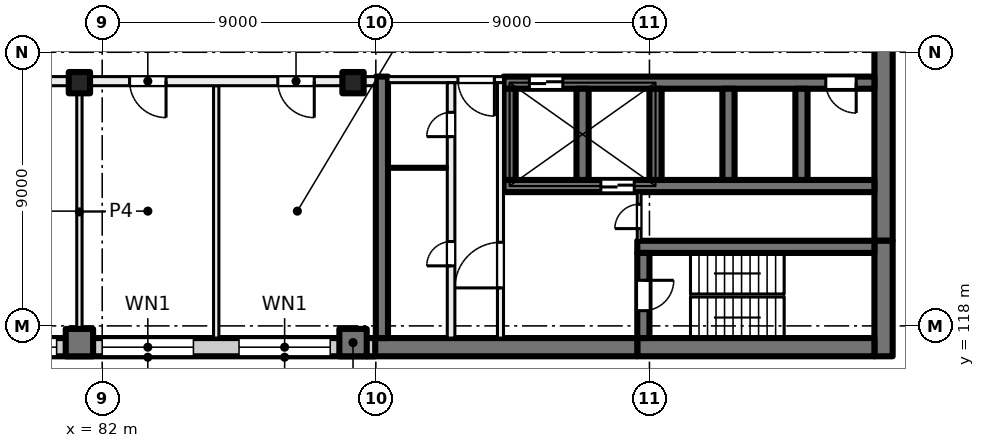
"""IFC4 building model, lengths in metres.
Left out: names, types, materials, properties, quantities, classifications, styles, units other than length and angle.
Written with IfcOpenShell. Run it as: python <this file> out.ifc"""

import sys

from ifc_helpers import new_model, si_unit, direction, frame, frame_2d, origin, origin_2d, place, context, subcontext, project, spatial, rectangle, extrude, element, fill, save


model = new_model("IFC4")
c1 = context("Model", 3, precision=1e-05, world=origin(), true_north=direction((0.0, 1.0)))
c2 = subcontext(c1, "Body", "Model", "MODEL_VIEW")
j1 = project(units=[si_unit("LENGTHUNIT", "METRE"), si_unit("PLANEANGLEUNIT", "RADIAN")], contexts=[c1])
p1 = place(None, origin())
s1 = spatial("IfcSite", under=j1, at=p1, CompositionType="ELEMENT")
p2 = place(p1, origin())
s2 = spatial("IfcBuilding", under=s1, at=p2, CompositionType="ELEMENT")
p3 = place(p2, frame((0.0, 0.0, 51.5)))
s3 = spatial("IfcBuildingStorey", under=s2, at=p3, CompositionType="ELEMENT", Elevation=51.5)
for number, where, z_axis, x_axis in (
    (1, (81.25, 126.0, 0.0), (0.0, 0.0, 1.0), (1.0, 0.0, 0.0)),
    (2, (90.25, 126.0, 0.0), (0.0, 0.0, 1.0), (1.0, 0.0, 0.0)),
):
    element("IfcColumn", number, at=place(p3, frame(where, z_axis=z_axis, x_axis=x_axis)), inside=s3, PredefinedType="COLUMN", context=c2, shape_type="SweptSolid", body=[
        extrude(rectangle(XDim=0.7, YDim=0.7, at=origin_2d()), origin(), (0.0, 0.0, 1.0), 4.0),
    ])
for number, where, z_axis, x_axis in (
    (3, (81.25, 117.45, 0.0), (0.0, 0.0, 1.0), (1.0, 0.0, 0.0)),
    (4, (90.25, 117.45, 0.0), (0.0, 0.0, 1.0), (1.0, 0.0, 0.0)),
):
    element("IfcColumn", number, at=place(p3, frame(where, z_axis=z_axis, x_axis=x_axis)), inside=s3, PredefinedType="COLUMN", context=c2, shape_type="SweptSolid", body=[
        extrude(rectangle(XDim=0.9, YDim=0.9, at=origin_2d()), origin(), (0.0, 0.0, 1.0), 4.0),
    ])
p4 = place(p3, frame((107.7, 135.2, 0.0), z_axis=(0.0, 0.0, 1.0), x_axis=(0.0, -1.0, 0.0)))
e5 = element("IfcWall", 5, at=p4, inside=s3, PredefinedType="SHEAR", context=c2, shape_type="SweptSolid", body=[
    extrude(rectangle(XDim=14.4, YDim=0.6, at=frame_2d((7.2, 0.0))), origin(), (0.0, 0.0, 1.0), 4.0),
])
p5 = place(p3, frame((107.7, 120.8, 0.0), z_axis=(0.0, 0.0, 1.0), x_axis=(0.0, -1.0, 0.0)))
e6 = element("IfcWall", 6, at=p5, inside=s3, PredefinedType="SHEAR", context=c2, shape_type="SweptSolid", body=[
    extrude(rectangle(XDim=3.8, YDim=0.6, at=frame_2d((1.9, 0.0))), origin(), (0.0, 0.0, 1.0), 4.0),
])
p6 = place(p3, frame((107.4, 117.3, 0.0), z_axis=(0.0, 0.0, 1.0), x_axis=(-1.0, 0.0, 0.0)))
e7 = element("IfcWall", 7, at=p6, inside=s3, PredefinedType="SHEAR", context=c2, shape_type="SweptSolid", body=[
    extrude(rectangle(XDim=7.8, YDim=0.6, at=frame_2d((3.9, 0.0))), origin(), (0.0, 0.0, 1.0), 4.0),
])
p7 = place(p3, frame((99.6, 117.3, 0.0), z_axis=(0.0, 0.0, 1.0), x_axis=(-1.0, 0.0, 0.0)))
e8 = element("IfcWall", 8, at=p7, inside=s3, PredefinedType="SHEAR", context=c2, shape_type="SweptSolid", body=[
    extrude(rectangle(XDim=8.9, YDim=0.6, at=frame_2d((4.45, 0.0))), origin(), (0.0, 0.0, 1.0), 4.0),
])
p8 = place(p3, frame((107.4, 120.6, 0.0), z_axis=(0.0, 0.0, 1.0), x_axis=(-1.0, 0.0, 0.0)))
e9 = element("IfcWall", 9, at=p8, inside=s3, PredefinedType="SHEAR", context=c2, shape_type="SweptSolid", body=[
    extrude(rectangle(XDim=7.8, YDim=0.4, at=frame_2d((3.9, 0.0))), origin(), (0.0, 0.0, 1.0), 4.0),
])
p9 = place(p3, frame((99.8, 120.4, 0.0), z_axis=(0.0, 0.0, 1.0), x_axis=(0.0, -1.0, 0.0)))
e10 = element("IfcWall", 10, at=p9, inside=s3, PredefinedType="SHEAR", context=c2, shape_type="SweptSolid", body=[
    extrude(rectangle(XDim=2.8, YDim=0.4, at=frame_2d((1.4, 0.0))), origin(), (0.0, 0.0, 1.0), 4.0),
])
p10 = place(p9, frame((0.9, 0.0, 0.0)))
e11 = element("IfcOpeningElement", 11, at=p10, cuts=e10, PredefinedType="OPENING", context=c2, shape_type="SweptSolid", body=[
    extrude(rectangle(XDim=1.0, YDim=2.1, at=frame_2d((0.5, 1.05))), frame((0.0, 0.21, 0.0), z_axis=(0.0, -1.0, 0.0), x_axis=(1.0, 0.0, 0.0)), (0.0, 0.0, 1.0), 0.42),
])
p11 = place(p3, frame((107.4, 126.0, 0.0), z_axis=(0.0, 0.0, 1.0), x_axis=(-1.0, 0.0, 0.0)))
e12 = element("IfcWall", 12, at=p11, inside=s3, PredefinedType="SHEAR", context=c2, shape_type="SweptSolid", body=[
    extrude(rectangle(XDim=12.2, YDim=0.4, at=frame_2d((6.1, 0.0))), origin(), (0.0, 0.0, 1.0), 4.0),
])
p12 = place(p11, frame((10.25, 0.0, 0.0)))
e13 = element("IfcOpeningElement", 13, at=p12, cuts=e12, PredefinedType="OPENING", context=c2, shape_type="SweptSolid", body=[
    extrude(rectangle(XDim=1.1, YDim=2.1, at=frame_2d((0.55, 1.05))), frame((0.0, 0.21, 0.0), z_axis=(0.0, -1.0, 0.0), x_axis=(1.0, 0.0, 0.0)), (0.0, 0.0, 1.0), 0.42),
])
p13 = place(p11, frame((0.6, 0.0, 0.0)))
e14 = element("IfcOpeningElement", 14, at=p13, cuts=e12, PredefinedType="OPENING", context=c2, shape_type="SweptSolid", body=[
    extrude(rectangle(XDim=1.0, YDim=2.1, at=frame_2d((0.5, 1.05))), frame((0.0, 0.21, 0.0), z_axis=(0.0, -1.0, 0.0), x_axis=(1.0, 0.0, 0.0)), (0.0, 0.0, 1.0), 0.42),
])
p14 = place(p3, frame((107.4, 122.6, 0.0), z_axis=(0.0, 0.0, 1.0), x_axis=(-1.0, 0.0, 0.0)))
e15 = element("IfcWall", 15, at=p14, inside=s3, PredefinedType="SHEAR", context=c2, shape_type="SweptSolid", body=[
    extrude(rectangle(XDim=12.2, YDim=0.4, at=frame_2d((6.1, 0.0))), origin(), (0.0, 0.0, 1.0), 4.0),
])
p15 = place(p14, frame((7.9, 0.0, 0.0)))
e16 = element("IfcOpeningElement", 16, at=p15, cuts=e15, PredefinedType="OPENING", context=c2, shape_type="SweptSolid", body=[
    extrude(rectangle(XDim=1.1, YDim=2.1, at=frame_2d((0.55, 1.05))), frame((0.0, 0.21, 0.0), z_axis=(0.0, -1.0, 0.0), x_axis=(1.0, 0.0, 0.0)), (0.0, 0.0, 1.0), 0.42),
])
for number, where, z_axis, x_axis in (
    (17, (105.0, 125.8, 0.0), (0.0, 0.0, 1.0), (0.0, -1.0, 0.0)),
    (18, (102.6, 125.8, 0.0), (0.0, 0.0, 1.0), (0.0, -1.0, 0.0)),
    (19, (100.2, 125.8, 0.0), (0.0, 0.0, 1.0), (0.0, -1.0, 0.0)),
    (20, (97.8, 125.8, 0.0), (0.0, 0.0, 1.0), (0.0, -1.0, 0.0)),
    (21, (95.4, 125.8, 0.0), (0.0, 0.0, 1.0), (0.0, -1.0, 0.0)),
):
    element("IfcWall", number, at=place(p3, frame(where, z_axis=z_axis, x_axis=x_axis)), inside=s3, PredefinedType="SHEAR", context=c2, shape_type="SweptSolid", body=[
        extrude(rectangle(XDim=3.0, YDim=0.4, at=frame_2d((1.5, 0.0))), origin(), (0.0, 0.0, 1.0), 4.0),
    ])
p16 = place(p3, frame((91.2, 126.2, 0.0), z_axis=(0.0, 0.0, 1.0), x_axis=(0.0, -1.0, 0.0)))
e22 = element("IfcWall", 22, at=p16, inside=s3, PredefinedType="SHEAR", context=c2, shape_type="SweptSolid", body=[
    extrude(rectangle(XDim=8.6, YDim=0.4, at=frame_2d((4.3, 0.0))), origin(), (0.0, 0.0, 1.0), 4.0),
])
p17 = place(p3, frame((90.98, 117.3, 0.0), z_axis=(0.0, 0.0, 1.0), x_axis=(-1.0, 0.0, 0.0)))
e23 = element("IfcWall", 23, at=p17, inside=s3, PredefinedType="SOLIDWALL", context=c2, shape_type="SweptSolid", body=[
    extrude(rectangle(XDim=33.745, YDim=0.6, at=frame_2d((16.873, 0.0))), origin(), (0.0, 0.0, 1.0), 3.625),
])
p18 = place(p17, frame((1.48, 0.0, 0.9)))
e24 = element("IfcOpeningElement", 24, at=p18, cuts=e23, PredefinedType="OPENING", context=c2, shape_type="SweptSolid", body=[
    extrude(rectangle(XDim=3.0, YDim=2.4, at=frame_2d((1.5, 1.2))), frame((0.0, 0.31, 0.0), z_axis=(0.0, -1.0, 0.0), x_axis=(1.0, 0.0, 0.0)), (0.0, 0.0, 1.0), 0.62),
])
p19 = place(p17, frame((5.98, 0.0, 0.9)))
e25 = element("IfcOpeningElement", 25, at=p19, cuts=e23, PredefinedType="OPENING", context=c2, shape_type="SweptSolid", body=[
    extrude(rectangle(XDim=3.0, YDim=2.4, at=frame_2d((1.5, 1.2))), frame((0.0, 0.31, 0.0), z_axis=(0.0, -1.0, 0.0), x_axis=(1.0, 0.0, 0.0)), (0.0, 0.0, 1.0), 0.62),
])
p20 = place(p17, frame((10.48, 0.0, 0.9)))
e26 = element("IfcOpeningElement", 26, at=p20, cuts=e23, PredefinedType="OPENING", context=c2, shape_type="SweptSolid", body=[
    extrude(rectangle(XDim=3.0, YDim=2.4, at=frame_2d((1.5, 1.2))), frame((0.0, 0.31, 0.0), z_axis=(0.0, -1.0, 0.0), x_axis=(1.0, 0.0, 0.0)), (0.0, 0.0, 1.0), 0.62),
])
p21 = place(p17, frame((14.98, 0.0, 0.9)))
e27 = element("IfcOpeningElement", 27, at=p21, cuts=e23, PredefinedType="OPENING", context=c2, shape_type="SweptSolid", body=[
    extrude(rectangle(XDim=3.0, YDim=2.4, at=frame_2d((1.5, 1.2))), frame((0.0, 0.31, 0.0), z_axis=(0.0, -1.0, 0.0), x_axis=(1.0, 0.0, 0.0)), (0.0, 0.0, 1.0), 0.62),
])
p22 = place(p17, frame((19.48, 0.0, 0.9)))
e28 = element("IfcOpeningElement", 28, at=p22, cuts=e23, PredefinedType="OPENING", context=c2, shape_type="SweptSolid", body=[
    extrude(rectangle(XDim=3.0, YDim=2.4, at=frame_2d((1.5, 1.2))), frame((0.0, 0.31, 0.0), z_axis=(0.0, -1.0, 0.0), x_axis=(1.0, 0.0, 0.0)), (0.0, 0.0, 1.0), 0.62),
])
p23 = place(p17, frame((23.98, 0.0, 0.9)))
e29 = element("IfcOpeningElement", 29, at=p23, cuts=e23, PredefinedType="OPENING", context=c2, shape_type="SweptSolid", body=[
    extrude(rectangle(XDim=3.0, YDim=2.4, at=frame_2d((1.5, 1.2))), frame((0.0, 0.31, 0.0), z_axis=(0.0, -1.0, 0.0), x_axis=(1.0, 0.0, 0.0)), (0.0, 0.0, 1.0), 0.62),
])
p24 = place(p17, frame((28.48, 0.0, 0.9)))
e30 = element("IfcOpeningElement", 30, at=p24, cuts=e23, PredefinedType="OPENING", context=c2, shape_type="SweptSolid", body=[
    extrude(rectangle(XDim=3.0, YDim=2.4, at=frame_2d((1.5, 1.2))), frame((0.0, 0.31, 0.0), z_axis=(0.0, -1.0, 0.0), x_axis=(1.0, 0.0, 0.0)), (0.0, 0.0, 1.0), 0.62),
])
p25 = place(p3, frame((95.2, 126.1, 0.0), z_axis=(0.0, 0.0, 1.0), x_axis=(-1.0, 0.0, 0.0)))
e31 = element("IfcWall", 31, at=p25, inside=s3, PredefinedType="PARTITIONING", context=c2, shape_type="SweptSolid", body=[
    extrude(rectangle(XDim=3.8, YDim=0.2, at=frame_2d((1.9, 0.0))), origin(), (0.0, 0.0, 1.0), 3.625),
])
p26 = place(p25, frame((0.3, 0.0, 0.0)))
e32 = element("IfcOpeningElement", 32, at=p26, cuts=e31, PredefinedType="OPENING", context=c2, shape_type="SweptSolid", body=[
    extrude(rectangle(XDim=1.2, YDim=2.1, at=frame_2d((0.6, 1.05))), frame((0.0, 0.11, 0.0), z_axis=(0.0, -1.0, 0.0), x_axis=(1.0, 0.0, 0.0)), (0.0, 0.0, 1.0), 0.22),
])
p27 = place(p3, frame((95.1, 117.6, 0.0), z_axis=(0.0, 0.0, 1.0), x_axis=(0.0, 1.0, 0.0)))
e33 = element("IfcWall", 33, at=p27, inside=s3, PredefinedType="PARTITIONING", context=c2, shape_type="SweptSolid", body=[
    extrude(rectangle(XDim=8.4, YDim=0.2, at=frame_2d((4.2, 0.0))), origin(), (0.0, 0.0, 1.0), 3.625),
])
p28 = place(p27, frame((1.65, 0.0, 0.0)))
e34 = element("IfcOpeningElement", 34, at=p28, cuts=e33, PredefinedType="OPENING", context=c2, shape_type="SweptSolid", body=[
    extrude(rectangle(XDim=1.5, YDim=2.1, at=frame_2d((0.75, 1.05))), frame((0.0, 0.11, 0.0), z_axis=(0.0, -1.0, 0.0), x_axis=(1.0, 0.0, 0.0)), (0.0, 0.0, 1.0), 0.22),
])
p29 = place(p3, frame((93.475, 117.6, 0.0), z_axis=(0.0, 0.0, 1.0), x_axis=(0.0, 1.0, 0.0)))
e35 = element("IfcWall", 35, at=p29, inside=s3, PredefinedType="PARTITIONING", context=c2, shape_type="SweptSolid", body=[
    extrude(rectangle(XDim=8.4, YDim=0.25, at=frame_2d((4.2, 0.0))), origin(), (0.0, 0.0, 1.0), 3.625),
])
p30 = place(p29, frame((6.625, 0.0, 0.0)))
e36 = element("IfcOpeningElement", 36, at=p30, cuts=e35, PredefinedType="OPENING", context=c2, shape_type="SweptSolid", body=[
    extrude(rectangle(XDim=0.8, YDim=2.1, at=frame_2d((0.4, 1.05))), frame((0.0, 0.135, 0.0), z_axis=(0.0, -1.0, 0.0), x_axis=(1.0, 0.0, 0.0)), (0.0, 0.0, 1.0), 0.27),
])
p31 = place(p29, frame((2.375, 0.0, 0.0)))
e37 = element("IfcOpeningElement", 37, at=p31, cuts=e35, PredefinedType="OPENING", context=c2, shape_type="SweptSolid", body=[
    extrude(rectangle(XDim=0.8, YDim=2.1, at=frame_2d((0.4, 1.05))), frame((0.0, 0.135, 0.0), z_axis=(0.0, -1.0, 0.0), x_axis=(1.0, 0.0, 0.0)), (0.0, 0.0, 1.0), 0.27),
])
p32 = place(p3, frame((99.663, 120.8, 0.0), z_axis=(0.0, 0.0, 1.0), x_axis=(0.0, 1.0, 0.0)))
e38 = element("IfcWall", 38, at=p32, inside=s3, PredefinedType="PARTITIONING", context=c2, shape_type="SweptSolid", body=[
    extrude(rectangle(XDim=1.6, YDim=0.125, at=frame_2d((0.8, 0.0))), origin(), (0.0, 0.0, 1.0), 3.625),
])
p33 = place(p32, frame((0.4, 0.0, 0.0)))
e39 = element("IfcOpeningElement", 39, at=p33, cuts=e38, PredefinedType="OPENING", context=c2, shape_type="SweptSolid", body=[
    extrude(rectangle(XDim=0.8, YDim=2.1, at=frame_2d((0.4, 1.05))), frame((0.0, 0.073, 0.0), z_axis=(0.0, -1.0, 0.0), x_axis=(1.0, 0.0, 0.0)), (0.0, 0.0, 1.0), 0.145),
])
p34 = place(p3, frame((93.35, 123.2, 0.0), z_axis=(0.0, 0.0, 1.0), x_axis=(-1.0, 0.0, 0.0)))
e40 = element("IfcWall", 40, at=p34, inside=s3, PredefinedType="PARTITIONING", context=c2, shape_type="SweptSolid", body=[
    extrude(rectangle(XDim=1.95, YDim=0.1, at=frame_2d((0.975, 0.0))), origin(), (0.0, 0.0, 1.0), 3.625),
])
for number, where, z_axis, x_axis in (
    (41, (81.25, 117.6, 0.0), (0.0, 0.0, 1.0), (0.0, 1.0, 0.0)),
    (42, (85.75, 117.6, 0.0), (0.0, 0.0, 1.0), (0.0, 1.0, 0.0)),
):
    element("IfcWall", number, at=place(p3, frame(where, z_axis=z_axis, x_axis=x_axis)), inside=s3, PredefinedType="PARTITIONING", context=c2, shape_type="SweptSolid", body=[
        extrude(rectangle(XDim=8.3, YDim=0.175, at=frame_2d((4.15, 0.0))), origin(), (0.0, 0.0, 1.0), 3.625),
    ])
p35 = place(p3, frame((91.0, 126.05, 0.0), z_axis=(0.0, 0.0, 1.0), x_axis=(-1.0, 0.0, 0.0)))
e43 = element("IfcWall", 43, at=p35, inside=s3, PredefinedType="PARTITIONING", context=c2, shape_type="SweptSolid", body=[
    extrude(rectangle(XDim=43.785, YDim=0.3, at=frame_2d((21.893, 0.0))), origin(), (0.0, 0.0, 1.0), 3.625),
])
p36 = place(p35, frame((2.025, 0.0, 0.0)))
e44 = element("IfcOpeningElement", 44, at=p36, cuts=e43, PredefinedType="OPENING", context=c2, shape_type="SweptSolid", body=[
    extrude(rectangle(XDim=1.2, YDim=2.1, at=frame_2d((0.6, 1.05))), frame((0.0, 0.16, 0.0), z_axis=(0.0, -1.0, 0.0), x_axis=(1.0, 0.0, 0.0)), (0.0, 0.0, 1.0), 0.32),
])
p37 = place(p35, frame((6.9, 0.0, 0.0)))
e45 = element("IfcOpeningElement", 45, at=p37, cuts=e43, PredefinedType="OPENING", context=c2, shape_type="SweptSolid", body=[
    extrude(rectangle(XDim=1.2, YDim=2.1, at=frame_2d((0.6, 1.05))), frame((0.0, 0.16, 0.0), z_axis=(0.0, -1.0, 0.0), x_axis=(1.0, 0.0, 0.0)), (0.0, 0.0, 1.0), 0.32),
])
p38 = place(p35, frame((15.6, 0.0, 0.0)))
e46 = element("IfcOpeningElement", 46, at=p38, cuts=e43, PredefinedType="OPENING", context=c2, shape_type="SweptSolid", body=[
    extrude(rectangle(XDim=1.8, YDim=2.1, at=frame_2d((0.9, 1.05))), frame((0.0, 0.16, 0.0), z_axis=(0.0, -1.0, 0.0), x_axis=(1.0, 0.0, 0.0)), (0.0, 0.0, 1.0), 0.32),
])
p39 = place(p35, frame((39.296, 0.0, 0.0)))
e47 = element("IfcOpeningElement", 47, at=p39, cuts=e43, PredefinedType="OPENING", context=c2, shape_type="SweptSolid", body=[
    extrude(rectangle(XDim=1.8, YDim=2.1, at=frame_2d((0.9, 1.05))), frame((0.0, 0.16, 0.0), z_axis=(0.0, -1.0, 0.0), x_axis=(1.0, 0.0, 0.0)), (0.0, 0.0, 1.0), 0.32),
])
p40 = place(p18, origin())
e48 = element("IfcWindow", 48, at=p40, inside=s3, PartitioningType="SINGLE_PANEL", PredefinedType="WINDOW", context=c2, shape_type="SweptSolid", body=[
    extrude(rectangle(XDim=3.0, YDim=2.4, at=frame_2d((1.5, 1.2))), frame((0.0, 0.03, 0.0), z_axis=(0.0, -1.0, 0.0), x_axis=(1.0, 0.0, 0.0)), (0.0, 0.0, 1.0), 0.06),
])
fill(e24, e48)
p41 = place(p19, origin())
e49 = element("IfcWindow", 49, at=p41, inside=s3, PartitioningType="SINGLE_PANEL", PredefinedType="WINDOW", context=c2, shape_type="SweptSolid", body=[
    extrude(rectangle(XDim=3.0, YDim=2.4, at=frame_2d((1.5, 1.2))), frame((0.0, 0.03, 0.0), z_axis=(0.0, -1.0, 0.0), x_axis=(1.0, 0.0, 0.0)), (0.0, 0.0, 1.0), 0.06),
])
fill(e25, e49)
p42 = place(p20, origin())
e50 = element("IfcWindow", 50, at=p42, inside=s3, PartitioningType="SINGLE_PANEL", PredefinedType="WINDOW", context=c2, shape_type="SweptSolid", body=[
    extrude(rectangle(XDim=3.0, YDim=2.4, at=frame_2d((1.5, 1.2))), frame((0.0, 0.03, 0.0), z_axis=(0.0, -1.0, 0.0), x_axis=(1.0, 0.0, 0.0)), (0.0, 0.0, 1.0), 0.06),
])
fill(e26, e50)
p43 = place(p12, origin())
e51 = element("IfcDoor", 51, at=p43, inside=s3, OperationType="DOUBLE_DOOR_SLIDING", PredefinedType="DOOR", context=c2, shape_type="SweptSolid", body=[
    extrude(rectangle(XDim=1.1, YDim=2.1, at=frame_2d((0.55, 1.05))), frame((0.0, 0.025, 0.0), z_axis=(0.0, -1.0, 0.0), x_axis=(1.0, 0.0, 0.0)), (0.0, 0.0, 1.0), 0.05),
])
fill(e13, e51)
p44 = place(p13, origin())
e52 = element("IfcDoor", 52, at=p44, inside=s3, OperationType="SINGLE_SWING_LEFT", PredefinedType="DOOR", context=c2, shape_type="SweptSolid", body=[
    extrude(rectangle(XDim=1.0, YDim=2.1, at=frame_2d((0.5, 1.05))), frame((0.0, 0.025, 0.0), z_axis=(0.0, -1.0, 0.0), x_axis=(1.0, 0.0, 0.0)), (0.0, 0.0, 1.0), 0.05),
])
fill(e14, e52)
p45 = place(p26, origin())
e53 = element("IfcDoor", 53, at=p45, inside=s3, OperationType="DOUBLE_DOOR_SINGLE_SWING", PredefinedType="DOOR", context=c2, shape_type="SweptSolid", body=[
    extrude(rectangle(XDim=1.2, YDim=2.1, at=frame_2d((0.6, 1.05))), frame((0.0, 0.025, 0.0), z_axis=(0.0, -1.0, 0.0), x_axis=(1.0, 0.0, 0.0)), (0.0, 0.0, 1.0), 0.05),
])
fill(e32, e53)
p46 = place(p28, origin())
e54 = element("IfcDoor", 54, at=p46, inside=s3, OperationType="DOUBLE_DOOR_SINGLE_SWING", PredefinedType="DOOR", context=c2, shape_type="SweptSolid", body=[
    extrude(rectangle(XDim=1.5, YDim=2.1, at=frame_2d((0.75, 1.05))), frame((0.0, 0.025, 0.0), z_axis=(0.0, -1.0, 0.0), x_axis=(1.0, 0.0, 0.0)), (0.0, 0.0, 1.0), 0.05),
])
fill(e34, e54)
p47 = place(p10, origin())
e55 = element("IfcDoor", 55, at=p47, inside=s3, OperationType="SINGLE_SWING_LEFT", PredefinedType="DOOR", context=c2, shape_type="SweptSolid", body=[
    extrude(rectangle(XDim=1.0, YDim=2.1, at=frame_2d((0.5, 1.05))), frame((0.0, 0.025, 0.0), z_axis=(0.0, -1.0, 0.0), x_axis=(1.0, 0.0, 0.0)), (0.0, 0.0, 1.0), 0.05),
])
fill(e11, e55)
p48 = place(p33, origin())
e56 = element("IfcDoor", 56, at=p48, inside=s3, OperationType="SINGLE_SWING_RIGHT", PredefinedType="DOOR", context=c2, shape_type="SweptSolid", body=[
    extrude(rectangle(XDim=0.8, YDim=2.1, at=frame_2d((0.4, 1.05))), frame((0.0, 0.025, 0.0), z_axis=(0.0, -1.0, 0.0), x_axis=(1.0, 0.0, 0.0)), (0.0, 0.0, 1.0), 0.05),
])
fill(e39, e56)
p49 = place(p30, origin())
e57 = element("IfcDoor", 57, at=p49, inside=s3, OperationType="SINGLE_SWING_LEFT", PredefinedType="DOOR", context=c2, shape_type="SweptSolid", body=[
    extrude(rectangle(XDim=0.8, YDim=2.1, at=frame_2d((0.4, 1.05))), frame((0.0, 0.025, 0.0), z_axis=(0.0, -1.0, 0.0), x_axis=(1.0, 0.0, 0.0)), (0.0, 0.0, 1.0), 0.05),
])
fill(e36, e57)
p50 = place(p31, origin())
e58 = element("IfcDoor", 58, at=p50, inside=s3, OperationType="SINGLE_SWING_RIGHT", PredefinedType="DOOR", context=c2, shape_type="SweptSolid", body=[
    extrude(rectangle(XDim=0.8, YDim=2.1, at=frame_2d((0.4, 1.05))), frame((0.0, 0.025, 0.0), z_axis=(0.0, -1.0, 0.0), x_axis=(1.0, 0.0, 0.0)), (0.0, 0.0, 1.0), 0.05),
])
fill(e37, e58)
p51 = place(p15, origin())
e59 = element("IfcDoor", 59, at=p51, inside=s3, OperationType="DOUBLE_DOOR_SLIDING", PredefinedType="DOOR", context=c2, shape_type="SweptSolid", body=[
    extrude(rectangle(XDim=1.1, YDim=2.1, at=frame_2d((0.55, 1.05))), frame((0.0, 0.025, 0.0), z_axis=(0.0, -1.0, 0.0), x_axis=(1.0, 0.0, 0.0)), (0.0, 0.0, 1.0), 0.05),
])
fill(e16, e59)
p52 = place(p36, origin())
e60 = element("IfcDoor", 60, at=p52, inside=s3, OperationType="DOUBLE_DOOR_SINGLE_SWING", PredefinedType="DOOR", context=c2, shape_type="SweptSolid", body=[
    extrude(rectangle(XDim=1.2, YDim=2.1, at=frame_2d((0.6, 1.05))), frame((0.0, 0.025, 0.0), z_axis=(0.0, -1.0, 0.0), x_axis=(1.0, 0.0, 0.0)), (0.0, 0.0, 1.0), 0.05),
])
fill(e44, e60)
p53 = place(p37, origin())
e61 = element("IfcDoor", 61, at=p53, inside=s3, OperationType="DOUBLE_DOOR_SINGLE_SWING", PredefinedType="DOOR", context=c2, shape_type="SweptSolid", body=[
    extrude(rectangle(XDim=1.2, YDim=2.1, at=frame_2d((0.6, 1.05))), frame((0.0, 0.025, 0.0), z_axis=(0.0, -1.0, 0.0), x_axis=(1.0, 0.0, 0.0)), (0.0, 0.0, 1.0), 0.05),
])
fill(e45, e61)
save(model, sys.argv[1])
